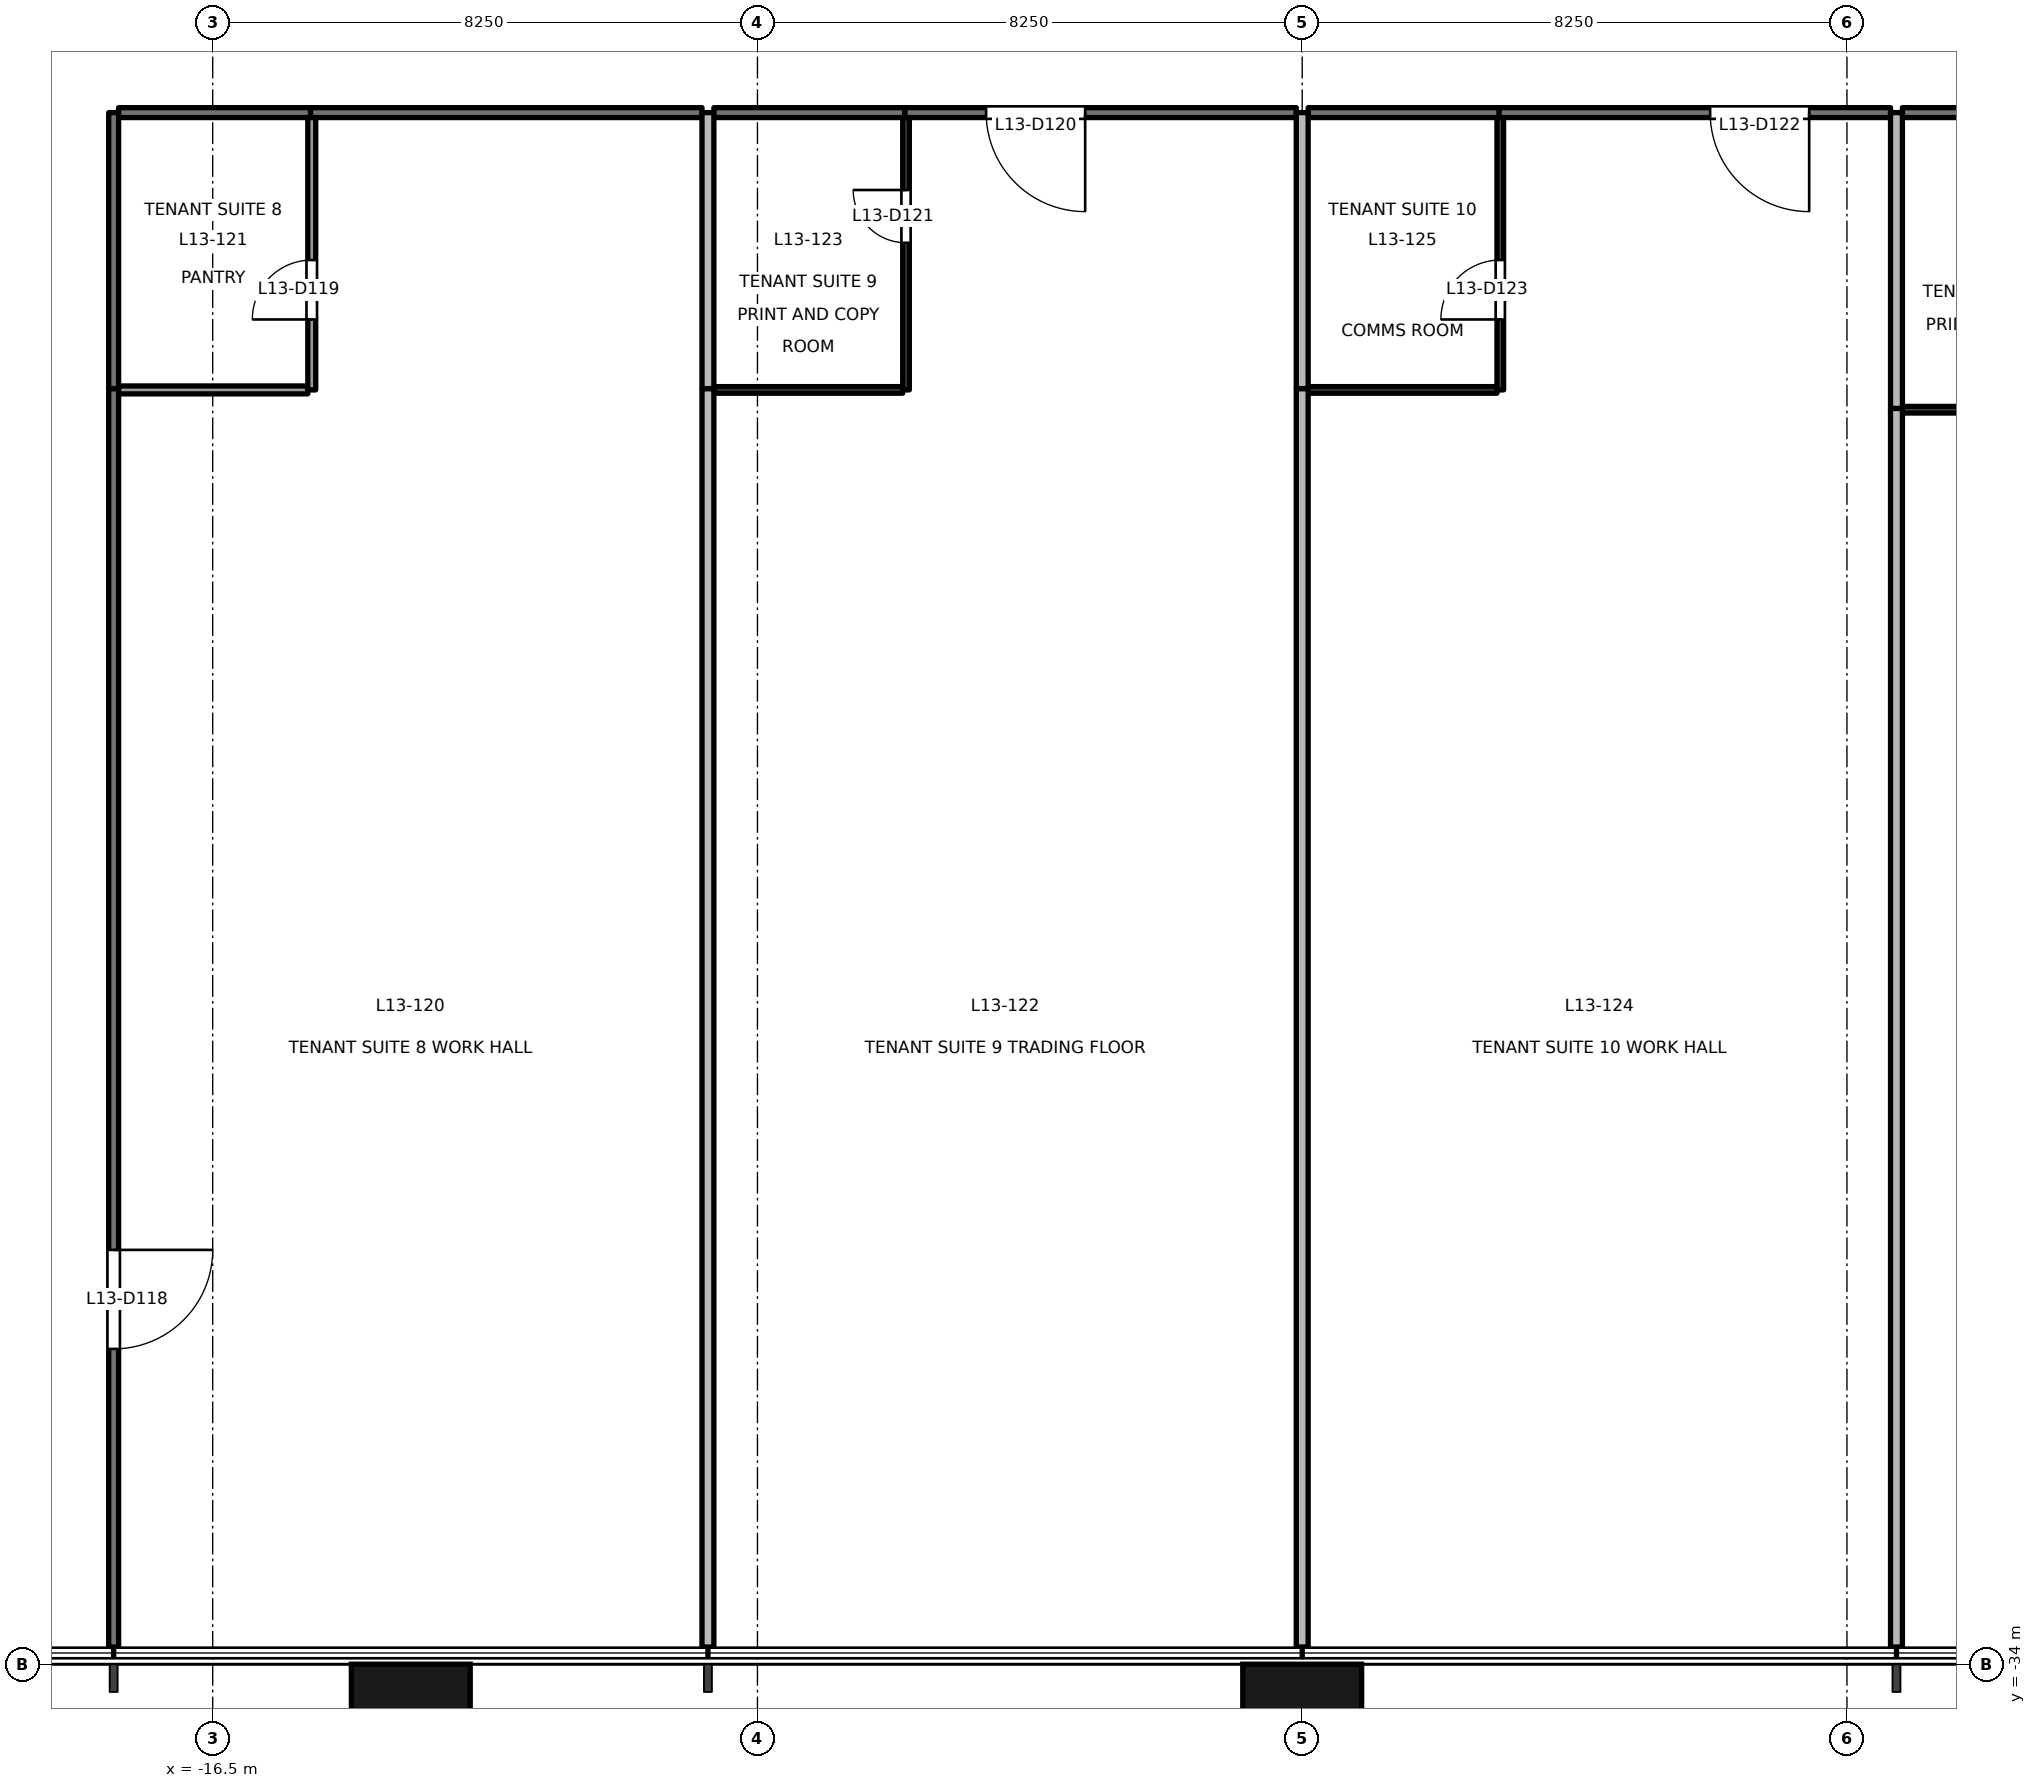
"""IFC4 building model, lengths in metres.
Left out: names, types, materials, properties, quantities, classifications, styles, units other than length and angle.
Written with IfcOpenShell. Run it as: python <this file> out.ifc"""

import sys

from ifc_helpers import new_model, si_unit, direction, frame, frame_2d, origin, origin_2d, place, context, subcontext, project, spatial, rectangle, extrude, element, fill, save


model = new_model("IFC4")
c1 = context("Model", 3, precision=1e-05, world=origin(), true_north=direction((0.0, 1.0)))
c2 = subcontext(c1, "Body", "Model", "MODEL_VIEW")
j1 = project(units=[si_unit("LENGTHUNIT", "METRE"), si_unit("PLANEANGLEUNIT", "RADIAN")], contexts=[c1])
p1 = place(None, origin())
s1 = spatial("IfcSite", under=j1, at=p1, CompositionType="ELEMENT")
p2 = place(p1, origin())
s2 = spatial("IfcBuilding", under=s1, at=p2, CompositionType="ELEMENT")
p3 = place(p2, frame((0.0, 0.0, 61.1)))
s3 = spatial("IfcBuildingStorey", under=s2, at=p3, CompositionType="ELEMENT", Elevation=61.1)
for number, where, z_axis, x_axis in (
    (1, (-13.5, -34.9, -0.2), (0.0, 0.0, 1.0), (1.0, 0.0, 0.0)),
    (2, (0.0, -34.9, -0.2), (0.0, 0.0, 1.0), (1.0, 0.0, 0.0)),
):
    element("IfcColumn", number, at=place(p3, frame(where, z_axis=z_axis, x_axis=x_axis)), inside=s3, PredefinedType="COLUMN", context=c2, shape_type="SweptSolid", body=[
        extrude(rectangle(XDim=1.8, YDim=1.8, at=origin_2d()), origin(), (0.0, 0.0, 1.0), 4.1),
    ])
p4 = place(p3, frame((-18.0, -14.68, 0.0), z_axis=(0.0, 0.0, 1.0), x_axis=(0.0, -1.0, 0.0)))
e3 = element("IfcWall", 3, at=p4, inside=s3, PredefinedType="PARTITIONING", context=c2, shape_type="SweptSolid", body=[
    extrude(rectangle(XDim=19.06, YDim=0.15, at=frame_2d((9.53, 0.0))), origin(), (0.0, 0.0, 1.0), 2.5),
])
p5 = place(p4, frame((13.045, 0.0, 0.0)))
e4 = element("IfcOpeningElement", 4, at=p5, cuts=e3, PredefinedType="OPENING", context=c2, shape_type="SweptSolid", body=[
    extrude(rectangle(XDim=1.5, YDim=2.1, at=frame_2d((0.75, 1.05))), frame((0.0, 0.085, 0.0), z_axis=(0.0, -1.0, 0.0), x_axis=(1.0, 0.0, 0.0)), (0.0, 0.0, 1.0), 0.171),
])
p6 = place(p3, frame((-9.09, -10.5, 0.0), z_axis=(0.0, 0.0, 1.0), x_axis=(-1.0, 0.0, 0.0)))
e5 = element("IfcWall", 5, at=p6, inside=s3, PredefinedType="PARTITIONING", context=c2, shape_type="SweptSolid", body=[
    extrude(rectangle(XDim=5.93, YDim=0.15, at=frame_2d((2.965, 0.0))), origin(), (0.0, 0.0, 1.0), 2.9),
])
p7 = place(p3, frame((-18.0, -10.5, 0.0), z_axis=(0.0, 0.0, 1.0), x_axis=(0.0, -1.0, 0.0)))
e6 = element("IfcWall", 6, at=p7, inside=s3, PredefinedType="PARTITIONING", context=c2, shape_type="SweptSolid", body=[
    extrude(rectangle(XDim=4.18, YDim=0.15, at=frame_2d((2.09, 0.0))), origin(), (0.0, 0.0, 1.0), 2.5),
])
p8 = place(p3, frame((-15.02, -10.5, 0.0), z_axis=(0.0, 0.0, 1.0), x_axis=(-1.0, 0.0, 0.0)))
e7 = element("IfcWall", 7, at=p8, inside=s3, PredefinedType="PARTITIONING", context=c2, shape_type="SweptSolid", body=[
    extrude(rectangle(XDim=2.905, YDim=0.15, at=frame_2d((1.453, 0.0))), origin(), (0.0, 0.0, 1.0), 2.5),
])
p9 = place(p3, frame((-0.09, -10.5, 0.0), z_axis=(0.0, 0.0, 1.0), x_axis=(-1.0, 0.0, 0.0)))
e8 = element("IfcWall", 8, at=p9, inside=s3, PredefinedType="PARTITIONING", context=c2, shape_type="SweptSolid", body=[
    extrude(rectangle(XDim=5.93, YDim=0.15, at=frame_2d((2.965, 0.0))), origin(), (0.0, 0.0, 1.0), 2.9),
])
p10 = place(p9, frame((3.197, 0.0, 0.0)))
e9 = element("IfcOpeningElement", 9, at=p10, cuts=e8, PredefinedType="OPENING", context=c2, shape_type="SweptSolid", body=[
    extrude(rectangle(XDim=1.5, YDim=2.1, at=frame_2d((0.75, 1.05))), frame((0.0, 0.085, 0.0), z_axis=(0.0, -1.0, 0.0), x_axis=(1.0, 0.0, 0.0)), (0.0, 0.0, 1.0), 0.171),
])
p11 = place(p3, frame((-6.02, -10.5, 0.0), z_axis=(0.0, 0.0, 1.0), x_axis=(-1.0, 0.0, 0.0)))
e10 = element("IfcWall", 10, at=p11, inside=s3, PredefinedType="PARTITIONING", context=c2, shape_type="SweptSolid", body=[
    extrude(rectangle(XDim=2.89, YDim=0.15, at=frame_2d((1.445, 0.0))), origin(), (0.0, 0.0, 1.0), 2.9),
])
p12 = place(p3, frame((8.91, -10.5, 0.0), z_axis=(0.0, 0.0, 1.0), x_axis=(-1.0, 0.0, 0.0)))
e11 = element("IfcWall", 11, at=p12, inside=s3, PredefinedType="PARTITIONING", context=c2, shape_type="SweptSolid", body=[
    extrude(rectangle(XDim=5.93, YDim=0.15, at=frame_2d((2.965, 0.0))), origin(), (0.0, 0.0, 1.0), 2.9),
])
p13 = place(p12, frame((1.232, 0.0, 0.0)))
e12 = element("IfcOpeningElement", 12, at=p13, cuts=e11, PredefinedType="OPENING", context=c2, shape_type="SweptSolid", body=[
    extrude(rectangle(XDim=1.5, YDim=2.1, at=frame_2d((0.75, 1.05))), frame((0.0, 0.085, 0.0), z_axis=(0.0, -1.0, 0.0), x_axis=(1.0, 0.0, 0.0)), (0.0, 0.0, 1.0), 0.171),
])
for number, where, z_axis, x_axis in (
    (13, (2.98, -10.5, 0.0), (0.0, 0.0, 1.0), (-1.0, 0.0, 0.0)),
    (14, (11.98, -10.5, 0.0), (0.0, 0.0, 1.0), (-1.0, 0.0, 0.0)),
):
    element("IfcWall", number, at=place(p3, frame(where, z_axis=z_axis, x_axis=x_axis)), inside=s3, PredefinedType="PARTITIONING", context=c2, shape_type="SweptSolid", body=[
        extrude(rectangle(XDim=2.89, YDim=0.15, at=frame_2d((1.445, 0.0))), origin(), (0.0, 0.0, 1.0), 2.9),
    ])
p14 = place(p3, frame((-17.925, -14.7, 0.0), z_axis=(0.0, 0.0, 1.0), x_axis=(1.0, 0.0, 0.0)))
e15 = element("IfcWall", 15, at=p14, inside=s3, PredefinedType="PARTITIONING", context=c2, shape_type="SweptSolid", body=[
    extrude(rectangle(XDim=2.865, YDim=0.12, at=frame_2d((1.433, 0.0))), origin(), (0.0, 0.0, 1.0), 2.5),
])
p15 = place(p3, frame((-15.0, -14.7, 0.0), z_axis=(0.0, 0.0, 1.0), x_axis=(0.0, 1.0, 0.0)))
e16 = element("IfcWall", 16, at=p15, inside=s3, PredefinedType="PARTITIONING", context=c2, shape_type="SweptSolid", body=[
    extrude(rectangle(XDim=4.125, YDim=0.12, at=frame_2d((2.062, 0.0))), origin(), (0.0, 0.0, 1.0), 3.9),
])
p16 = place(p15, frame((1.067, 0.0, 0.0)))
e17 = element("IfcOpeningElement", 17, at=p16, cuts=e16, PredefinedType="OPENING", context=c2, shape_type="SweptSolid", body=[
    extrude(rectangle(XDim=0.9, YDim=2.1, at=frame_2d((0.45, 1.05))), frame((0.0, 0.071, 0.0), z_axis=(0.0, -1.0, 0.0), x_axis=(1.0, 0.0, 0.0)), (0.0, 0.0, 1.0), 0.141),
])
p17 = place(p3, frame((-9.0, -14.68, 0.0), z_axis=(0.0, 0.0, 1.0), x_axis=(0.0, -1.0, 0.0)))
e18 = element("IfcWall", 18, at=p17, inside=s3, PredefinedType="PARTITIONING", context=c2, shape_type="SweptSolid", body=[
    extrude(rectangle(XDim=19.06, YDim=0.18, at=frame_2d((9.53, 0.0))), origin(), (0.0, 0.0, 1.0), 2.9),
])
p18 = place(p3, frame((-9.0, -10.5, 0.0), z_axis=(0.0, 0.0, 1.0), x_axis=(0.0, -1.0, 0.0)))
e19 = element("IfcWall", 19, at=p18, inside=s3, PredefinedType="PARTITIONING", context=c2, shape_type="SweptSolid", body=[
    extrude(rectangle(XDim=4.18, YDim=0.18, at=frame_2d((2.09, 0.0))), origin(), (0.0, 0.0, 1.0), 2.9),
])
p19 = place(p3, frame((-8.91, -14.7, 0.0), z_axis=(0.0, 0.0, 1.0), x_axis=(1.0, 0.0, 0.0)))
e20 = element("IfcWall", 20, at=p19, inside=s3, PredefinedType="PARTITIONING", context=c2, shape_type="SweptSolid", body=[
    extrude(rectangle(XDim=2.86, YDim=0.1, at=frame_2d((1.43, 0.0))), origin(), (0.0, 0.0, 1.0), 2.9),
])
p20 = place(p3, frame((-6.0, -14.7, 0.0), z_axis=(0.0, 0.0, 1.0), x_axis=(0.0, 1.0, 0.0)))
e21 = element("IfcWall", 21, at=p20, inside=s3, PredefinedType="PARTITIONING", context=c2, shape_type="SweptSolid", body=[
    extrude(rectangle(XDim=4.125, YDim=0.1, at=frame_2d((2.062, 0.0))), origin(), (0.0, 0.0, 1.0), 3.9),
])
p21 = place(p20, frame((2.228, 0.0, 0.0)))
e22 = element("IfcOpeningElement", 22, at=p21, cuts=e21, PredefinedType="OPENING", context=c2, shape_type="SweptSolid", body=[
    extrude(rectangle(XDim=0.8, YDim=2.1, at=frame_2d((0.4, 1.05))), frame((0.0, 0.061, 0.0), z_axis=(0.0, -1.0, 0.0), x_axis=(1.0, 0.0, 0.0)), (0.0, 0.0, 1.0), 0.121),
])
p22 = place(p3, frame((0.0, -14.68, 0.0), z_axis=(0.0, 0.0, 1.0), x_axis=(0.0, -1.0, 0.0)))
e23 = element("IfcWall", 23, at=p22, inside=s3, PredefinedType="PARTITIONING", context=c2, shape_type="SweptSolid", body=[
    extrude(rectangle(XDim=19.06, YDim=0.18, at=frame_2d((9.53, 0.0))), origin(), (0.0, 0.0, 1.0), 2.9),
])
p23 = place(p3, frame((0.0, -10.5, 0.0), z_axis=(0.0, 0.0, 1.0), x_axis=(0.0, -1.0, 0.0)))
e24 = element("IfcWall", 24, at=p23, inside=s3, PredefinedType="PARTITIONING", context=c2, shape_type="SweptSolid", body=[
    extrude(rectangle(XDim=4.18, YDim=0.18, at=frame_2d((2.09, 0.0))), origin(), (0.0, 0.0, 1.0), 2.9),
])
p24 = place(p3, frame((0.09, -14.7, 0.0), z_axis=(0.0, 0.0, 1.0), x_axis=(1.0, 0.0, 0.0)))
e25 = element("IfcWall", 25, at=p24, inside=s3, PredefinedType="PARTITIONING", context=c2, shape_type="SweptSolid", body=[
    extrude(rectangle(XDim=2.86, YDim=0.1, at=frame_2d((1.43, 0.0))), origin(), (0.0, 0.0, 1.0), 2.9),
])
p25 = place(p3, frame((3.0, -14.7, 0.0), z_axis=(0.0, 0.0, 1.0), x_axis=(0.0, 1.0, 0.0)))
e26 = element("IfcWall", 26, at=p25, inside=s3, PredefinedType="PARTITIONING", context=c2, shape_type="SweptSolid", body=[
    extrude(rectangle(XDim=4.125, YDim=0.1, at=frame_2d((2.062, 0.0))), origin(), (0.0, 0.0, 1.0), 3.9),
])
p26 = place(p25, frame((1.067, 0.0, 0.0)))
e27 = element("IfcOpeningElement", 27, at=p26, cuts=e26, PredefinedType="OPENING", context=c2, shape_type="SweptSolid", body=[
    extrude(rectangle(XDim=0.9, YDim=2.1, at=frame_2d((0.45, 1.05))), frame((0.0, 0.061, 0.0), z_axis=(0.0, -1.0, 0.0), x_axis=(1.0, 0.0, 0.0)), (0.0, 0.0, 1.0), 0.121),
])
p27 = place(p3, frame((9.0, -14.98, 0.0), z_axis=(0.0, 0.0, 1.0), x_axis=(0.0, -1.0, 0.0)))
e28 = element("IfcWall", 28, at=p27, inside=s3, PredefinedType="PARTITIONING", context=c2, shape_type="SweptSolid", body=[
    extrude(rectangle(XDim=18.76, YDim=0.18, at=frame_2d((9.38, 0.0))), origin(), (0.0, 0.0, 1.0), 2.9),
])
p28 = place(p3, frame((9.0, -10.5, 0.0), z_axis=(0.0, 0.0, 1.0), x_axis=(0.0, -1.0, 0.0)))
e29 = element("IfcWall", 29, at=p28, inside=s3, PredefinedType="PARTITIONING", context=c2, shape_type="SweptSolid", body=[
    extrude(rectangle(XDim=4.48, YDim=0.18, at=frame_2d((2.24, 0.0))), origin(), (0.0, 0.0, 1.0), 2.9),
])
p29 = place(p3, frame((9.09, -15.0, 0.0), z_axis=(0.0, 0.0, 1.0), x_axis=(1.0, 0.0, 0.0)))
e30 = element("IfcWall", 30, at=p29, inside=s3, PredefinedType="PARTITIONING", context=c2, shape_type="SweptSolid", body=[
    extrude(rectangle(XDim=2.86, YDim=0.1, at=frame_2d((1.43, 0.0))), origin(), (0.0, 0.0, 1.0), 2.9),
])
p30 = place(p5, origin())
e31 = element("IfcDoor", 31, at=p30, inside=s3, OperationType="DOUBLE_DOOR_SINGLE_SWING", PredefinedType="DOOR", context=c2, shape_type="SweptSolid", body=[
    extrude(rectangle(XDim=1.5, YDim=2.1, at=frame_2d((0.75, 1.05))), frame((0.0, 0.025, 0.0), z_axis=(0.0, -1.0, 0.0), x_axis=(1.0, 0.0, 0.0)), (0.0, 0.0, 1.0), 0.05),
])
fill(e4, e31)
p31 = place(p16, origin())
e32 = element("IfcDoor", 32, at=p31, inside=s3, OperationType="SINGLE_SWING_LEFT", PredefinedType="DOOR", context=c2, shape_type="SweptSolid", body=[
    extrude(rectangle(XDim=0.9, YDim=2.1, at=frame_2d((0.45, 1.05))), frame((0.0, 0.025, 0.0), z_axis=(0.0, -1.0, 0.0), x_axis=(1.0, 0.0, 0.0)), (0.0, 0.0, 1.0), 0.05),
])
fill(e17, e32)
p32 = place(p10, origin())
e33 = element("IfcDoor", 33, at=p32, inside=s3, OperationType="DOUBLE_DOOR_SINGLE_SWING", PredefinedType="DOOR", context=c2, shape_type="SweptSolid", body=[
    extrude(rectangle(XDim=1.5, YDim=2.1, at=frame_2d((0.75, 1.05))), frame((0.0, 0.025, 0.0), z_axis=(0.0, -1.0, 0.0), x_axis=(1.0, 0.0, 0.0)), (0.0, 0.0, 1.0), 0.05),
])
fill(e9, e33)
p33 = place(p21, origin())
e34 = element("IfcDoor", 34, at=p33, inside=s3, OperationType="SINGLE_SWING_RIGHT", PredefinedType="DOOR", context=c2, shape_type="SweptSolid", body=[
    extrude(rectangle(XDim=0.8, YDim=2.1, at=frame_2d((0.4, 1.05))), frame((0.0, 0.025, 0.0), z_axis=(0.0, -1.0, 0.0), x_axis=(1.0, 0.0, 0.0)), (0.0, 0.0, 1.0), 0.05),
])
fill(e22, e34)
p34 = place(p13, origin())
e35 = element("IfcDoor", 35, at=p34, inside=s3, OperationType="DOUBLE_DOOR_SINGLE_SWING", PredefinedType="DOOR", context=c2, shape_type="SweptSolid", body=[
    extrude(rectangle(XDim=1.5, YDim=2.1, at=frame_2d((0.75, 1.05))), frame((0.0, 0.025, 0.0), z_axis=(0.0, -1.0, 0.0), x_axis=(1.0, 0.0, 0.0)), (0.0, 0.0, 1.0), 0.05),
])
fill(e12, e35)
p35 = place(p26, origin())
e36 = element("IfcDoor", 36, at=p35, inside=s3, OperationType="SINGLE_SWING_LEFT", PredefinedType="DOOR", context=c2, shape_type="SweptSolid", body=[
    extrude(rectangle(XDim=0.9, YDim=2.1, at=frame_2d((0.45, 1.05))), frame((0.0, 0.025, 0.0), z_axis=(0.0, -1.0, 0.0), x_axis=(1.0, 0.0, 0.0)), (0.0, 0.0, 1.0), 0.05),
])
fill(e27, e36)
save(model, sys.argv[1])
